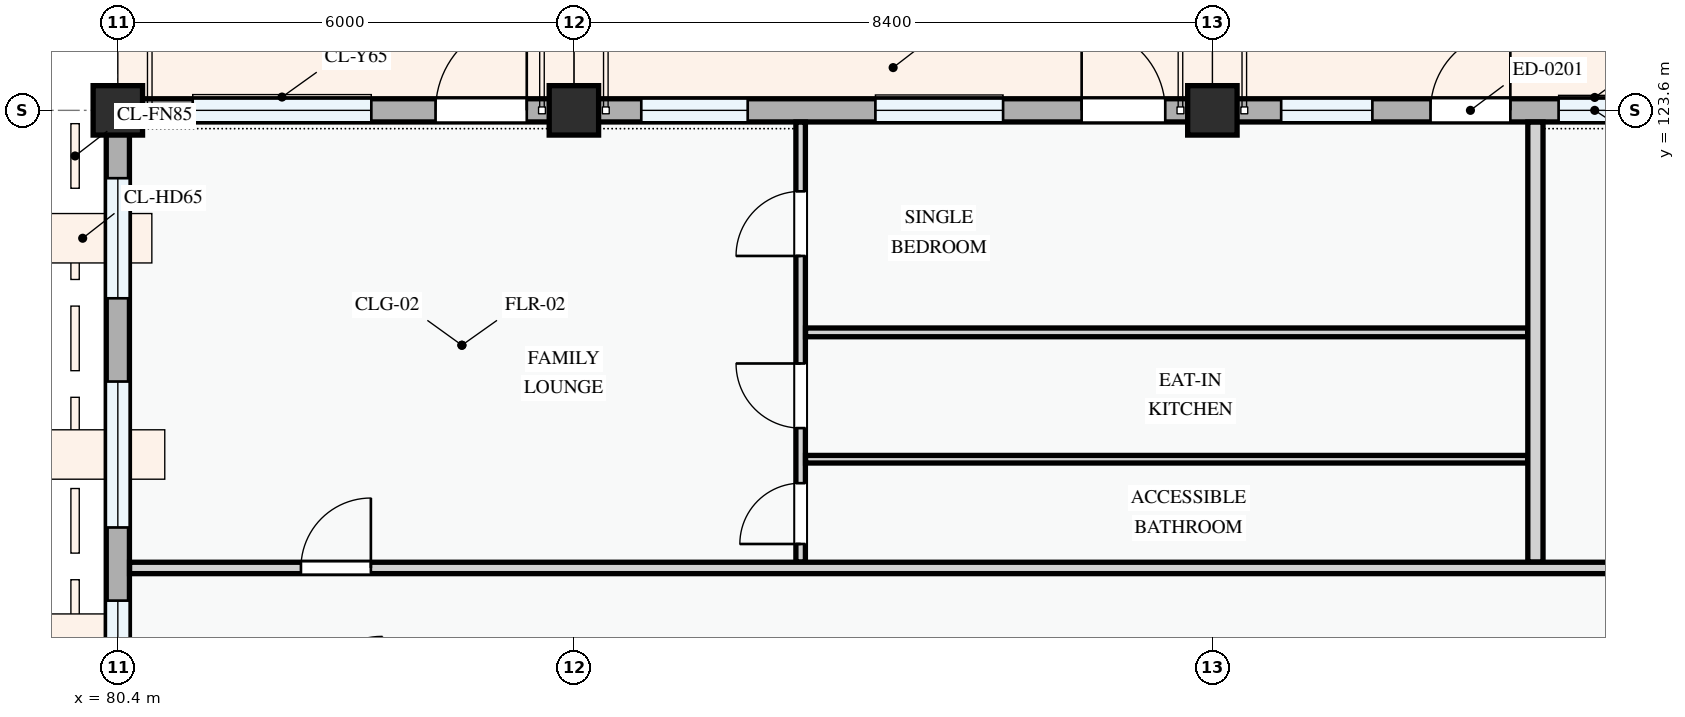
"""IFC4 building model, lengths in metres.
Left out: names, types, materials, properties, quantities, classifications, styles, units other than length and angle.
Written with IfcOpenShell. Run it as: python <this file> out.ifc"""

import sys

from ifc_helpers import new_model, si_unit, direction, frame, frame_2d, origin, origin_2d, place, context, subcontext, project, spatial, rectangle, extrude, element, fill, save


model = new_model("IFC4")
c1 = context("Model", 3, precision=1e-05, world=origin(), true_north=direction((0.0, 1.0)))
c2 = subcontext(c1, "Body", "Model", "MODEL_VIEW")
j1 = project(units=[si_unit("LENGTHUNIT", "METRE"), si_unit("PLANEANGLEUNIT", "RADIAN")], contexts=[c1])
p1 = place(None, origin())
s1 = spatial("IfcSite", under=j1, at=p1, CompositionType="ELEMENT")
p2 = place(p1, origin())
s2 = spatial("IfcBuilding", under=s1, at=p2, CompositionType="ELEMENT")
p3 = place(p2, frame((0.0, 0.0, 21.3)))
s3 = spatial("IfcBuildingStorey", under=s2, at=p3, CompositionType="ELEMENT", Elevation=21.3)
for number, where, z_axis, x_axis in (
    (1, (80.4, 123.6, 0.0), (0.0, 0.0, 1.0), (1.0, 0.0, 0.0)),
    (2, (86.4, 123.6, 0.0), (0.0, 0.0, 1.0), (1.0, 0.0, 0.0)),
    (3, (94.8, 123.6, 0.0), (0.0, 0.0, 1.0), (1.0, 0.0, 0.0)),
):
    element("IfcColumn", number, at=place(p3, frame(where, z_axis=z_axis, x_axis=x_axis)), inside=s3, PredefinedType="COLUMN", context=c2, shape_type="SweptSolid", body=[
        extrude(rectangle(XDim=0.65, YDim=0.65, at=origin_2d()), origin(), (0.0, 0.0, 1.0), 3.3),
    ])
p4 = place(p3, frame((100.8, 123.6, 0.0), z_axis=(0.0, 0.0, 1.0), x_axis=(-1.0, 0.0, 0.0)))
e4 = element("IfcWall", 4, at=p4, inside=s3, PredefinedType="STANDARD", context=c2, shape_type="SweptSolid", body=[
    extrude(rectangle(XDim=6.0, YDim=0.305, at=frame_2d((3.0, 0.0))), origin(), (0.0, 0.0, 1.0), 2.445),
])
p5 = place(p4, frame((2.08, 0.0, 0.0)))
e5 = element("IfcOpeningElement", 5, at=p5, cuts=e4, PredefinedType="OPENING", context=c2, shape_type="SweptSolid", body=[
    extrude(rectangle(XDim=1.05, YDim=2.15, at=frame_2d((0.525, 1.075))), frame((0.0, 0.163, 0.0), z_axis=(0.0, -1.0, 0.0), x_axis=(1.0, 0.0, 0.0)), (0.0, 0.0, 1.0), 0.325),
])
p6 = place(p4, frame((0.495, 0.0, 0.78)))
e6 = element("IfcOpeningElement", 6, at=p6, cuts=e4, PredefinedType="OPENING", context=c2, shape_type="SweptSolid", body=[
    extrude(rectangle(XDim=0.95, YDim=1.15, at=frame_2d((0.475, 0.575))), frame((0.0, 0.163, 0.0), z_axis=(0.0, -1.0, 0.0), x_axis=(1.0, 0.0, 0.0)), (0.0, 0.0, 1.0), 0.325),
])
p7 = place(p4, frame((3.895, 0.0, 0.78)))
e7 = element("IfcOpeningElement", 7, at=p7, cuts=e4, PredefinedType="OPENING", context=c2, shape_type="SweptSolid", body=[
    extrude(rectangle(XDim=1.2, YDim=1.5, at=frame_2d((0.6, 0.75))), frame((0.0, 0.163, 0.0), z_axis=(0.0, -1.0, 0.0), x_axis=(1.0, 0.0, 0.0)), (0.0, 0.0, 1.0), 0.325),
])
p8 = place(p3, frame((94.8, 123.6, 0.0), z_axis=(0.0, 0.0, 1.0), x_axis=(-1.0, 0.0, 0.0)))
e8 = element("IfcWall", 8, at=p8, inside=s3, PredefinedType="STANDARD", context=c2, shape_type="SweptSolid", body=[
    extrude(rectangle(XDim=8.4, YDim=0.305, at=frame_2d((4.2, 0.0))), origin(), (0.0, 0.0, 1.0), 2.345),
])
p9 = place(p8, frame((0.62, 0.0, 0.0)))
e9 = element("IfcOpeningElement", 9, at=p9, cuts=e8, PredefinedType="OPENING", context=c2, shape_type="SweptSolid", body=[
    extrude(rectangle(XDim=1.1, YDim=2.15, at=frame_2d((0.55, 1.075))), frame((0.0, 0.163, 0.0), z_axis=(0.0, -1.0, 0.0), x_axis=(1.0, 0.0, 0.0)), (0.0, 0.0, 1.0), 0.325),
])
p10 = place(p8, frame((2.753, 0.0, 0.78)))
e10 = element("IfcOpeningElement", 10, at=p10, cuts=e8, PredefinedType="OPENING", context=c2, shape_type="SweptSolid", body=[
    extrude(rectangle(XDim=1.68, YDim=1.46, at=frame_2d((0.84, 0.73))), frame((0.0, 0.163, 0.0), z_axis=(0.0, -1.0, 0.0), x_axis=(1.0, 0.0, 0.0)), (0.0, 0.0, 1.0), 0.325),
])
p11 = place(p8, frame((6.113, 0.0, 0.78)))
e11 = element("IfcOpeningElement", 11, at=p11, cuts=e8, PredefinedType="OPENING", context=c2, shape_type="SweptSolid", body=[
    extrude(rectangle(XDim=1.4, YDim=1.45, at=frame_2d((0.7, 0.725))), frame((0.0, 0.163, 0.0), z_axis=(0.0, -1.0, 0.0), x_axis=(1.0, 0.0, 0.0)), (0.0, 0.0, 1.0), 0.325),
])
p12 = place(p3, frame((86.4, 123.6, 0.0), z_axis=(0.0, 0.0, 1.0), x_axis=(-1.0, 0.0, 0.0)))
e12 = element("IfcWall", 12, at=p12, inside=s3, PredefinedType="STANDARD", context=c2, shape_type="SweptSolid", body=[
    extrude(rectangle(XDim=6.0, YDim=0.305, at=frame_2d((3.0, 0.0))), origin(), (0.0, 0.0, 1.0), 2.445),
])
p13 = place(p12, frame((0.62, 0.0, 0.0)))
e13 = element("IfcOpeningElement", 13, at=p13, cuts=e12, PredefinedType="OPENING", context=c2, shape_type="SweptSolid", body=[
    extrude(rectangle(XDim=1.2, YDim=2.15, at=frame_2d((0.6, 1.075))), frame((0.0, 0.163, 0.0), z_axis=(0.0, -1.0, 0.0), x_axis=(1.0, 0.0, 0.0)), (0.0, 0.0, 1.0), 0.325),
])
p14 = place(p12, frame((2.665, 0.0, 0.78)))
e14 = element("IfcOpeningElement", 14, at=p14, cuts=e12, PredefinedType="OPENING", context=c2, shape_type="SweptSolid", body=[
    extrude(rectangle(XDim=2.35, YDim=1.55, at=frame_2d((1.175, 0.775))), frame((0.0, 0.163, 0.0), z_axis=(0.0, -1.0, 0.0), x_axis=(1.0, 0.0, 0.0)), (0.0, 0.0, 1.0), 0.325),
])
p15 = place(p3, frame((80.4, 123.6, 0.0), z_axis=(0.0, 0.0, 1.0), x_axis=(0.0, -1.0, 0.0)))
e15 = element("IfcWall", 15, at=p15, inside=s3, PredefinedType="STANDARD", context=c2, shape_type="SweptSolid", body=[
    extrude(rectangle(XDim=8.4, YDim=0.305, at=frame_2d((4.2, 0.0))), origin(), (0.0, 0.0, 1.0), 2.425),
])
p16 = place(p15, frame((0.893, 0.0, 0.78)))
e16 = element("IfcOpeningElement", 16, at=p16, cuts=e15, PredefinedType="OPENING", context=c2, shape_type="SweptSolid", body=[
    extrude(rectangle(XDim=1.58, YDim=1.48, at=frame_2d((0.79, 0.74))), frame((0.0, 0.163, 0.0), z_axis=(0.0, -1.0, 0.0), x_axis=(1.0, 0.0, 0.0)), (0.0, 0.0, 1.0), 0.325),
])
p17 = place(p15, frame((3.567, 0.0, 0.78)))
e17 = element("IfcOpeningElement", 17, at=p17, cuts=e15, PredefinedType="OPENING", context=c2, shape_type="SweptSolid", body=[
    extrude(rectangle(XDim=1.92, YDim=1.44, at=frame_2d((0.96, 0.72))), frame((0.0, 0.163, 0.0), z_axis=(0.0, -1.0, 0.0), x_axis=(1.0, 0.0, 0.0)), (0.0, 0.0, 1.0), 0.325),
])
p18 = place(p15, frame((6.45, 0.0, 0.78)))
e18 = element("IfcOpeningElement", 18, at=p18, cuts=e15, PredefinedType="OPENING", context=c2, shape_type="SweptSolid", body=[
    extrude(rectangle(XDim=1.0, YDim=1.25, at=frame_2d((0.5, 0.625))), frame((0.0, 0.163, 0.0), z_axis=(0.0, -1.0, 0.0), x_axis=(1.0, 0.0, 0.0)), (0.0, 0.0, 1.0), 0.325),
])
p19 = place(p3, frame((89.383, 117.657, 0.0), z_axis=(0.0, 0.0, 1.0), x_axis=(0.0, 1.0, 0.0)))
e19 = element("IfcWall", 19, at=p19, inside=s3, PredefinedType="PARTITIONING", context=c2, shape_type="SweptSolid", body=[
    extrude(rectangle(XDim=5.789, YDim=0.125, at=frame_2d((2.894, 0.0))), origin(), (0.0, 0.0, 1.0), 3.0),
])
p20 = place(p19, frame((0.238, 0.0, 0.0)))
e20 = element("IfcOpeningElement", 20, at=p20, cuts=e19, PredefinedType="OPENING", context=c2, shape_type="SweptSolid", body=[
    extrude(rectangle(XDim=0.8, YDim=2.1, at=frame_2d((0.4, 1.05))), frame((0.0, 0.073, 0.0), z_axis=(0.0, -1.0, 0.0), x_axis=(1.0, 0.0, 0.0)), (0.0, 0.0, 1.0), 0.145),
])
p21 = place(p19, frame((1.763, 0.0, 0.0)))
e21 = element("IfcOpeningElement", 21, at=p21, cuts=e19, PredefinedType="OPENING", context=c2, shape_type="SweptSolid", body=[
    extrude(rectangle(XDim=0.85, YDim=2.1, at=frame_2d((0.425, 1.05))), frame((0.0, 0.073, 0.0), z_axis=(0.0, -1.0, 0.0), x_axis=(1.0, 0.0, 0.0)), (0.0, 0.0, 1.0), 0.145),
])
p22 = place(p19, frame((4.028, 0.0, 0.0)))
e22 = element("IfcOpeningElement", 22, at=p22, cuts=e19, PredefinedType="OPENING", context=c2, shape_type="SweptSolid", body=[
    extrude(rectangle(XDim=0.85, YDim=2.1, at=frame_2d((0.425, 1.05))), frame((0.0, 0.073, 0.0), z_axis=(0.0, -1.0, 0.0), x_axis=(1.0, 0.0, 0.0)), (0.0, 0.0, 1.0), 0.145),
])
p23 = place(p3, frame((89.448, 120.679, 0.0), z_axis=(0.0, 0.0, 1.0), x_axis=(1.0, 0.0, 0.0)))
e23 = element("IfcWall", 23, at=p23, inside=s3, PredefinedType="PARTITIONING", context=c2, shape_type="SweptSolid", body=[
    extrude(rectangle(XDim=9.5, YDim=0.115, at=frame_2d((4.75, 0.0))), origin(), (0.0, 0.0, 1.0), 3.0),
])
p24 = place(p3, frame((89.448, 119.01, 0.0), z_axis=(0.0, 0.0, 1.0), x_axis=(1.0, 0.0, 0.0)))
e24 = element("IfcWall", 24, at=p24, inside=s3, PredefinedType="PARTITIONING", context=c2, shape_type="SweptSolid", body=[
    extrude(rectangle(XDim=9.5, YDim=0.1, at=frame_2d((4.75, 0.0))), origin(), (0.0, 0.0, 1.0), 3.0),
])
p25 = place(p3, frame((99.05, 117.657, 0.0), z_axis=(0.0, 0.0, 1.0), x_axis=(0.0, 1.0, 0.0)))
e25 = element("IfcWall", 25, at=p25, inside=s3, PredefinedType="PARTITIONING", context=c2, shape_type="SweptSolid", body=[
    extrude(rectangle(XDim=5.789, YDim=0.2, at=frame_2d((2.894, 0.0))), origin(), (0.0, 0.0, 1.0), 3.0),
])
p26 = place(p3, frame((80.554, 117.58, 0.0), z_axis=(0.0, 0.0, 1.0), x_axis=(1.0, 0.0, 0.0)))
e26 = element("IfcWall", 26, at=p26, inside=s3, PredefinedType="PARTITIONING", context=c2, shape_type="SweptSolid", body=[
    extrude(rectangle(XDim=71.986, YDim=0.15, at=frame_2d((35.993, 0.0))), origin(), (0.0, 0.0, 1.0), 3.0),
])
p27 = place(p26, frame((2.254, 0.0, 0.0)))
e27 = element("IfcOpeningElement", 27, at=p27, cuts=e26, PredefinedType="OPENING", context=c2, shape_type="SweptSolid", body=[
    extrude(rectangle(XDim=0.92, YDim=2.1, at=frame_2d((0.46, 1.05))), frame((0.0, 0.085, 0.0), z_axis=(0.0, -1.0, 0.0), x_axis=(1.0, 0.0, 0.0)), (0.0, 0.0, 1.0), 0.17),
])
p28 = place(p26, frame((23.937, 0.0, 0.0)))
e28 = element("IfcOpeningElement", 28, at=p28, cuts=e26, PredefinedType="OPENING", context=c2, shape_type="SweptSolid", body=[
    extrude(rectangle(XDim=0.96, YDim=2.12, at=frame_2d((0.48, 1.06))), frame((0.0, 0.085, 0.0), z_axis=(0.0, -1.0, 0.0), x_axis=(1.0, 0.0, 0.0)), (0.0, 0.0, 1.0), 0.17),
])
p29 = place(p26, frame((39.125, 0.0, 0.0)))
e29 = element("IfcOpeningElement", 29, at=p29, cuts=e26, PredefinedType="OPENING", context=c2, shape_type="SweptSolid", body=[
    extrude(rectangle(XDim=0.92, YDim=2.1, at=frame_2d((0.46, 1.05))), frame((0.0, 0.085, 0.0), z_axis=(0.0, -1.0, 0.0), x_axis=(1.0, 0.0, 0.0)), (0.0, 0.0, 1.0), 0.17),
])
p30 = place(p26, frame((59.922, 0.0, 0.0)))
e30 = element("IfcOpeningElement", 30, at=p30, cuts=e26, PredefinedType="OPENING", context=c2, shape_type="SweptSolid", body=[
    extrude(rectangle(XDim=0.92, YDim=2.1, at=frame_2d((0.46, 1.05))), frame((0.0, 0.085, 0.0), z_axis=(0.0, -1.0, 0.0), x_axis=(1.0, 0.0, 0.0)), (0.0, 0.0, 1.0), 0.17),
])
p31 = place(p5, frame((1.05, 0.0, 0.0), z_axis=(0.0, 0.0, 1.0), x_axis=(-1.0, 0.0, 0.0)))
e31 = element("IfcDoor", 31, at=p31, inside=s3, OperationType="SINGLE_SWING_RIGHT", PredefinedType="DOOR", context=c2, shape_type="SweptSolid", body=[
    extrude(rectangle(XDim=1.05, YDim=2.15, at=frame_2d((0.525, 1.075))), frame((0.0, 0.025, 0.0), z_axis=(0.0, -1.0, 0.0), x_axis=(1.0, 0.0, 0.0)), (0.0, 0.0, 1.0), 0.05),
])
fill(e5, e31)
p32 = place(p6, origin())
e32 = element("IfcWindow", 32, at=p32, inside=s3, PartitioningType="SINGLE_PANEL", PredefinedType="WINDOW", context=c2, shape_type="SweptSolid", body=[
    extrude(rectangle(XDim=0.95, YDim=1.15, at=frame_2d((0.475, 0.575))), frame((0.0, 0.03, 0.0), z_axis=(0.0, -1.0, 0.0), x_axis=(1.0, 0.0, 0.0)), (0.0, 0.0, 1.0), 0.06),
])
fill(e6, e32)
p33 = place(p7, origin())
e33 = element("IfcWindow", 33, at=p33, inside=s3, PartitioningType="SINGLE_PANEL", PredefinedType="WINDOW", context=c2, shape_type="SweptSolid", body=[
    extrude(rectangle(XDim=1.2, YDim=1.5, at=frame_2d((0.6, 0.75))), frame((0.0, 0.03, 0.0), z_axis=(0.0, -1.0, 0.0), x_axis=(1.0, 0.0, 0.0)), (0.0, 0.0, 1.0), 0.06),
])
fill(e7, e33)
p34 = place(p9, frame((1.1, 0.0, 0.0), z_axis=(0.0, 0.0, 1.0), x_axis=(-1.0, 0.0, 0.0)))
e34 = element("IfcDoor", 34, at=p34, inside=s3, OperationType="SINGLE_SWING_LEFT", PredefinedType="DOOR", context=c2, shape_type="SweptSolid", body=[
    extrude(rectangle(XDim=1.1, YDim=2.15, at=frame_2d((0.55, 1.075))), frame((0.0, 0.025, 0.0), z_axis=(0.0, -1.0, 0.0), x_axis=(1.0, 0.0, 0.0)), (0.0, 0.0, 1.0), 0.05),
])
fill(e9, e34)
p35 = place(p10, origin())
e35 = element("IfcWindow", 35, at=p35, inside=s3, PartitioningType="DOUBLE_PANEL_VERTICAL", PredefinedType="WINDOW", context=c2, shape_type="SweptSolid", body=[
    extrude(rectangle(XDim=1.68, YDim=1.46, at=frame_2d((0.84, 0.73))), frame((0.0, 0.03, 0.0), z_axis=(0.0, -1.0, 0.0), x_axis=(1.0, 0.0, 0.0)), (0.0, 0.0, 1.0), 0.06),
])
fill(e10, e35)
p36 = place(p11, origin())
e36 = element("IfcWindow", 36, at=p36, inside=s3, PartitioningType="SINGLE_PANEL", PredefinedType="WINDOW", context=c2, shape_type="SweptSolid", body=[
    extrude(rectangle(XDim=1.4, YDim=1.45, at=frame_2d((0.7, 0.725))), frame((0.0, 0.03, 0.0), z_axis=(0.0, -1.0, 0.0), x_axis=(1.0, 0.0, 0.0)), (0.0, 0.0, 1.0), 0.06),
])
fill(e11, e36)
p37 = place(p13, frame((1.2, 0.0, 0.0), z_axis=(0.0, 0.0, 1.0), x_axis=(-1.0, 0.0, 0.0)))
e37 = element("IfcDoor", 37, at=p37, inside=s3, OperationType="SINGLE_SWING_RIGHT", PredefinedType="DOOR", context=c2, shape_type="SweptSolid", body=[
    extrude(rectangle(XDim=1.2, YDim=2.15, at=frame_2d((0.6, 1.075))), frame((0.0, 0.025, 0.0), z_axis=(0.0, -1.0, 0.0), x_axis=(1.0, 0.0, 0.0)), (0.0, 0.0, 1.0), 0.05),
])
fill(e13, e37)
p38 = place(p14, origin())
e38 = element("IfcWindow", 38, at=p38, inside=s3, PartitioningType="DOUBLE_PANEL_VERTICAL", PredefinedType="WINDOW", context=c2, shape_type="SweptSolid", body=[
    extrude(rectangle(XDim=2.35, YDim=1.55, at=frame_2d((1.175, 0.775))), frame((0.0, 0.03, 0.0), z_axis=(0.0, -1.0, 0.0), x_axis=(1.0, 0.0, 0.0)), (0.0, 0.0, 1.0), 0.06),
])
fill(e14, e38)
p39 = place(p16, origin())
e39 = element("IfcWindow", 39, at=p39, inside=s3, PartitioningType="SINGLE_PANEL", PredefinedType="WINDOW", context=c2, shape_type="SweptSolid", body=[
    extrude(rectangle(XDim=1.58, YDim=1.48, at=frame_2d((0.79, 0.74))), frame((0.0, 0.03, 0.0), z_axis=(0.0, -1.0, 0.0), x_axis=(1.0, 0.0, 0.0)), (0.0, 0.0, 1.0), 0.06),
])
fill(e16, e39)
p40 = place(p17, origin())
e40 = element("IfcWindow", 40, at=p40, inside=s3, PartitioningType="DOUBLE_PANEL_VERTICAL", PredefinedType="WINDOW", context=c2, shape_type="SweptSolid", body=[
    extrude(rectangle(XDim=1.92, YDim=1.44, at=frame_2d((0.96, 0.72))), frame((0.0, 0.03, 0.0), z_axis=(0.0, -1.0, 0.0), x_axis=(1.0, 0.0, 0.0)), (0.0, 0.0, 1.0), 0.06),
])
fill(e17, e40)
p41 = place(p18, origin())
e41 = element("IfcWindow", 41, at=p41, inside=s3, PartitioningType="SINGLE_PANEL", PredefinedType="WINDOW", context=c2, shape_type="SweptSolid", body=[
    extrude(rectangle(XDim=1.0, YDim=1.25, at=frame_2d((0.5, 0.625))), frame((0.0, 0.03, 0.0), z_axis=(0.0, -1.0, 0.0), x_axis=(1.0, 0.0, 0.0)), (0.0, 0.0, 1.0), 0.06),
])
fill(e18, e41)
p42 = place(p20, origin())
e42 = element("IfcDoor", 42, at=p42, inside=s3, OperationType="SINGLE_SWING_LEFT", PredefinedType="DOOR", context=c2, shape_type="SweptSolid", body=[
    extrude(rectangle(XDim=0.8, YDim=2.1, at=frame_2d((0.4, 1.05))), frame((0.0, 0.025, 0.0), z_axis=(0.0, -1.0, 0.0), x_axis=(1.0, 0.0, 0.0)), (0.0, 0.0, 1.0), 0.05),
])
fill(e20, e42)
p43 = place(p21, origin())
e43 = element("IfcDoor", 43, at=p43, inside=s3, OperationType="SINGLE_SWING_RIGHT", PredefinedType="DOOR", context=c2, shape_type="SweptSolid", body=[
    extrude(rectangle(XDim=0.85, YDim=2.1, at=frame_2d((0.425, 1.05))), frame((0.0, 0.025, 0.0), z_axis=(0.0, -1.0, 0.0), x_axis=(1.0, 0.0, 0.0)), (0.0, 0.0, 1.0), 0.05),
])
fill(e21, e43)
p44 = place(p22, origin())
e44 = element("IfcDoor", 44, at=p44, inside=s3, OperationType="SINGLE_SWING_LEFT", PredefinedType="DOOR", context=c2, shape_type="SweptSolid", body=[
    extrude(rectangle(XDim=0.85, YDim=2.1, at=frame_2d((0.425, 1.05))), frame((0.0, 0.025, 0.0), z_axis=(0.0, -1.0, 0.0), x_axis=(1.0, 0.0, 0.0)), (0.0, 0.0, 1.0), 0.05),
])
fill(e22, e44)
p45 = place(p27, origin())
e45 = element("IfcDoor", 45, at=p45, inside=s3, OperationType="SINGLE_SWING_RIGHT", PredefinedType="DOOR", context=c2, shape_type="SweptSolid", body=[
    extrude(rectangle(XDim=0.92, YDim=2.1, at=frame_2d((0.46, 1.05))), frame((0.0, 0.025, 0.0), z_axis=(0.0, -1.0, 0.0), x_axis=(1.0, 0.0, 0.0)), (0.0, 0.0, 1.0), 0.05),
])
fill(e27, e45)
save(model, sys.argv[1])
